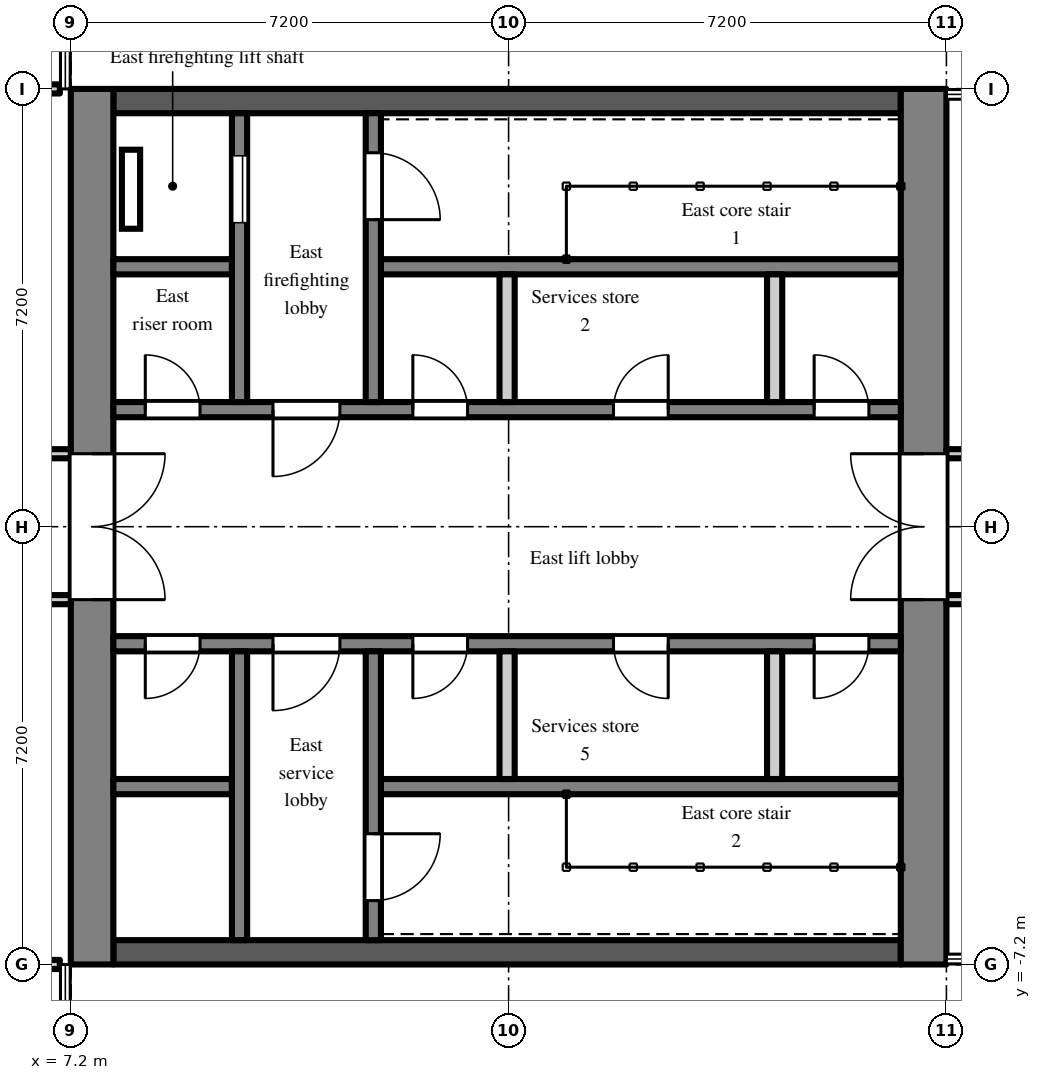
"""IFC4 building model, lengths in metres.
Left out: names, types, materials, properties, quantities, classifications, styles, units other than length and angle.
Written with IfcOpenShell. Run it as: python <this file> out.ifc"""

import sys

from ifc_helpers import new_model, si_unit, direction, frame, frame_2d, origin, place, context, subcontext, project, spatial, polyline, rectangle, outline, extrude, element, fill, save


model = new_model("IFC4")
c1 = context("Model", 3, precision=1e-05, world=origin(), true_north=direction((0.0, 1.0)))
c2 = subcontext(c1, "Body", "Model", "MODEL_VIEW")
j1 = project(units=[si_unit("LENGTHUNIT", "METRE"), si_unit("PLANEANGLEUNIT", "RADIAN")], contexts=[c1])
p1 = place(None, origin())
s1 = spatial("IfcSite", under=j1, at=p1, CompositionType="ELEMENT")
p2 = place(p1, origin())
s2 = spatial("IfcBuilding", under=s1, at=p2, CompositionType="ELEMENT")
p3 = place(p2, frame((0.0, 0.0, 247.5)))
s3 = spatial("IfcBuildingStorey", under=s2, at=p3, CompositionType="ELEMENT", Elevation=247.5)
p4 = place(p3, frame((7.55, -7.2, 0.0), z_axis=(0.0, 0.0, 1.0), x_axis=(0.0, 1.0, 0.0)))
e1 = element("IfcWall", 1, at=p4, inside=s3, PredefinedType="SHEAR", context=c2, shape_type="SweptSolid", body=[
    extrude(outline(polyline([(0.0, 0.0), (14.4, 0.0), (14.4, 10.033), (7.2, 13.7), (0.0, 10.033), (0.0, 0.0)])), frame((0.0, 0.35, 0.0), z_axis=(0.0, -1.0, 0.0), x_axis=(1.0, 0.0, 0.0)), (0.0, 0.0, 1.0), 0.7),
])
p5 = place(p4, frame((6.0, 0.0, 0.0)))
e2 = element("IfcOpeningElement", 2, at=p5, cuts=e1, PredefinedType="OPENING", context=c2, shape_type="SweptSolid", body=[
    extrude(rectangle(XDim=2.4, YDim=2.2, at=frame_2d((1.2, 1.1))), frame((0.0, 0.36, 0.0), z_axis=(0.0, -1.0, 0.0), x_axis=(1.0, 0.0, 0.0)), (0.0, 0.0, 1.0), 0.72),
])
p6 = place(p3, frame((21.225, -7.2, 0.0), z_axis=(0.0, 0.0, 1.0), x_axis=(0.0, 1.0, 0.0)))
e3 = element("IfcWall", 3, at=p6, inside=s3, PredefinedType="SHEAR", context=c2, shape_type="SweptSolid", body=[
    extrude(outline(polyline([(0.0, 0.0), (14.4, 0.0), (14.4, 10.033), (7.2, 13.7), (0.0, 10.033), (0.0, 0.0)])), frame((0.0, 0.375, 0.0), z_axis=(0.0, -1.0, 0.0), x_axis=(1.0, 0.0, 0.0)), (0.0, 0.0, 1.0), 0.75),
])
p7 = place(p6, frame((6.0, 0.0, 0.0)))
e4 = element("IfcOpeningElement", 4, at=p7, cuts=e3, PredefinedType="OPENING", context=c2, shape_type="SweptSolid", body=[
    extrude(rectangle(XDim=2.4, YDim=2.2, at=frame_2d((1.2, 1.1))), frame((0.0, 0.385, 0.0), z_axis=(0.0, -1.0, 0.0), x_axis=(1.0, 0.0, 0.0)), (0.0, 0.0, 1.0), 0.77),
])
p8 = place(p3, frame((7.9, 7.0, 0.0), z_axis=(0.0, 0.0, 1.0), x_axis=(1.0, 0.0, 0.0)))
e5 = element("IfcWall", 5, at=p8, inside=s3, PredefinedType="SHEAR", context=c2, shape_type="SweptSolid", body=[
    extrude(rectangle(XDim=12.95, YDim=0.4, at=frame_2d((6.475, 0.0))), origin(), (0.0, 0.0, 1.0), 10.135),
])
p9 = place(p3, frame((7.9, 1.925, 0.0), z_axis=(0.0, 0.0, 1.0), x_axis=(1.0, 0.0, 0.0)))
e6 = element("IfcWall", 6, at=p9, inside=s3, PredefinedType="SHEAR", context=c2, shape_type="SweptSolid", body=[
    extrude(rectangle(XDim=12.95, YDim=0.25, at=frame_2d((6.475, 0.0))), origin(), (0.0, 0.0, 1.0), 12.72),
])
p10 = place(p9, frame((0.525, 0.0, 0.0)))
e7 = element("IfcOpeningElement", 7, at=p10, cuts=e6, PredefinedType="OPENING", context=c2, shape_type="SweptSolid", body=[
    extrude(rectangle(XDim=0.9, YDim=2.1, at=frame_2d((0.45, 1.05))), frame((0.0, 0.135, 0.0), z_axis=(0.0, -1.0, 0.0), x_axis=(1.0, 0.0, 0.0)), (0.0, 0.0, 1.0), 0.27),
])
p11 = place(p9, frame((2.625, 0.0, 0.0)))
e8 = element("IfcOpeningElement", 8, at=p11, cuts=e6, PredefinedType="OPENING", context=c2, shape_type="SweptSolid", body=[
    extrude(rectangle(XDim=1.1, YDim=2.1, at=frame_2d((0.55, 1.05))), frame((0.0, 0.135, 0.0), z_axis=(0.0, -1.0, 0.0), x_axis=(1.0, 0.0, 0.0)), (0.0, 0.0, 1.0), 0.27),
])
p12 = place(p9, frame((4.925, 0.0, 0.0)))
e9 = element("IfcOpeningElement", 9, at=p12, cuts=e6, PredefinedType="OPENING", context=c2, shape_type="SweptSolid", body=[
    extrude(rectangle(XDim=0.9, YDim=2.1, at=frame_2d((0.45, 1.05))), frame((0.0, 0.135, 0.0), z_axis=(0.0, -1.0, 0.0), x_axis=(1.0, 0.0, 0.0)), (0.0, 0.0, 1.0), 0.27),
])
p13 = place(p9, frame((8.225, 0.0, 0.0)))
e10 = element("IfcOpeningElement", 10, at=p13, cuts=e6, PredefinedType="OPENING", context=c2, shape_type="SweptSolid", body=[
    extrude(rectangle(XDim=0.9, YDim=2.1, at=frame_2d((0.45, 1.05))), frame((0.0, 0.135, 0.0), z_axis=(0.0, -1.0, 0.0), x_axis=(1.0, 0.0, 0.0)), (0.0, 0.0, 1.0), 0.27),
])
p14 = place(p9, frame((11.525, 0.0, 0.0)))
e11 = element("IfcOpeningElement", 11, at=p14, cuts=e6, PredefinedType="OPENING", context=c2, shape_type="SweptSolid", body=[
    extrude(rectangle(XDim=0.9, YDim=2.1, at=frame_2d((0.45, 1.05))), frame((0.0, 0.135, 0.0), z_axis=(0.0, -1.0, 0.0), x_axis=(1.0, 0.0, 0.0)), (0.0, 0.0, 1.0), 0.27),
])
p15 = place(p3, frame((7.9, 4.275, 0.0), z_axis=(0.0, 0.0, 1.0), x_axis=(1.0, 0.0, 0.0)))
e12 = element("IfcWall", 12, at=p15, inside=s3, PredefinedType="SHEAR", context=c2, shape_type="SweptSolid", body=[
    extrude(rectangle(XDim=1.95, YDim=0.25, at=frame_2d((0.975, 0.0))), origin(), (0.0, 0.0, 1.0), 11.523),
])
p16 = place(p3, frame((12.3, 4.275, 0.0), z_axis=(0.0, 0.0, 1.0), x_axis=(1.0, 0.0, 0.0)))
e13 = element("IfcWall", 13, at=p16, inside=s3, PredefinedType="SHEAR", context=c2, shape_type="SweptSolid", body=[
    extrude(rectangle(XDim=8.55, YDim=0.25, at=frame_2d((4.275, 0.0))), origin(), (0.0, 0.0, 1.0), 11.523),
])
p17 = place(p3, frame((9.975, 2.05, 0.0), z_axis=(0.0, 0.0, 1.0), x_axis=(0.0, 1.0, 0.0)))
e14 = element("IfcWall", 14, at=p17, inside=s3, PredefinedType="SHEAR", context=c2, shape_type="SweptSolid", body=[
    extrude(outline(polyline([(0.0, 0.0), (4.75, 0.0), (4.75, 10.237), (0.0, 12.656), (0.0, 0.0)])), frame((0.0, 0.125, 0.0), z_axis=(0.0, -1.0, 0.0), x_axis=(1.0, 0.0, 0.0)), (0.0, 0.0, 1.0), 0.25),
])
p18 = place(p17, frame((2.95, 0.0, 0.0)))
e15 = element("IfcOpeningElement", 15, at=p18, cuts=e14, PredefinedType="OPENING", context=c2, shape_type="SweptSolid", body=[
    extrude(rectangle(XDim=1.1, YDim=2.1, at=frame_2d((0.55, 1.05))), frame((0.0, 0.135, 0.0), z_axis=(0.0, -1.0, 0.0), x_axis=(1.0, 0.0, 0.0)), (0.0, 0.0, 1.0), 0.27),
])
p19 = place(p3, frame((12.175, 2.05, 0.0), z_axis=(0.0, 0.0, 1.0), x_axis=(0.0, 1.0, 0.0)))
e16 = element("IfcWall", 16, at=p19, inside=s3, PredefinedType="SHEAR", context=c2, shape_type="SweptSolid", body=[
    extrude(outline(polyline([(0.0, 0.0), (4.75, 0.0), (4.75, 10.237), (0.0, 12.656), (0.0, 0.0)])), frame((0.0, 0.125, 0.0), z_axis=(0.0, -1.0, 0.0), x_axis=(1.0, 0.0, 0.0)), (0.0, 0.0, 1.0), 0.25),
])
p20 = place(p19, frame((3.0, 0.0, 0.0)))
e17 = element("IfcOpeningElement", 17, at=p20, cuts=e16, PredefinedType="OPENING", context=c2, shape_type="SweptSolid", body=[
    extrude(rectangle(XDim=1.1, YDim=2.1, at=frame_2d((0.55, 1.05))), frame((0.0, 0.135, 0.0), z_axis=(0.0, -1.0, 0.0), x_axis=(1.0, 0.0, 0.0)), (0.0, 0.0, 1.0), 0.27),
])
for number, where, z_axis, x_axis in (
    (18, (14.375, 2.05, 0.0), (0.0, 0.0, 1.0), (0.0, 1.0, 0.0)),
    (19, (18.775, 2.05, 0.0), (0.0, 0.0, 1.0), (0.0, 1.0, 0.0)),
):
    element("IfcWall", number, at=place(p3, frame(where, z_axis=z_axis, x_axis=x_axis)), inside=s3, PredefinedType="PARTITIONING", context=c2, shape_type="SweptSolid", body=[
        extrude(outline(polyline([(0.0, 0.0), (2.1, 0.0), (2.1, 11.587), (0.0, 12.656), (0.0, 0.0)])), frame((0.0, 0.125, 0.0), z_axis=(0.0, -1.0, 0.0), x_axis=(1.0, 0.0, 0.0)), (0.0, 0.0, 1.0), 0.25),
    ])
p21 = place(p3, frame((7.9, -7.0, 0.0), z_axis=(0.0, 0.0, 1.0), x_axis=(1.0, 0.0, 0.0)))
e20 = element("IfcWall", 20, at=p21, inside=s3, PredefinedType="SHEAR", context=c2, shape_type="SweptSolid", body=[
    extrude(rectangle(XDim=12.95, YDim=0.4, at=frame_2d((6.475, 0.0))), origin(), (0.0, 0.0, 1.0), 10.135),
])
p22 = place(p3, frame((7.9, -1.925, 0.0), z_axis=(0.0, 0.0, 1.0), x_axis=(1.0, 0.0, 0.0)))
e21 = element("IfcWall", 21, at=p22, inside=s3, PredefinedType="SHEAR", context=c2, shape_type="SweptSolid", body=[
    extrude(rectangle(XDim=12.95, YDim=0.25, at=frame_2d((6.475, 0.0))), origin(), (0.0, 0.0, 1.0), 12.72),
])
p23 = place(p22, frame((0.525, 0.0, 0.0)))
e22 = element("IfcOpeningElement", 22, at=p23, cuts=e21, PredefinedType="OPENING", context=c2, shape_type="SweptSolid", body=[
    extrude(rectangle(XDim=0.9, YDim=2.1, at=frame_2d((0.45, 1.05))), frame((0.0, 0.135, 0.0), z_axis=(0.0, -1.0, 0.0), x_axis=(1.0, 0.0, 0.0)), (0.0, 0.0, 1.0), 0.27),
])
p24 = place(p22, frame((2.625, 0.0, 0.0)))
e23 = element("IfcOpeningElement", 23, at=p24, cuts=e21, PredefinedType="OPENING", context=c2, shape_type="SweptSolid", body=[
    extrude(rectangle(XDim=1.1, YDim=2.1, at=frame_2d((0.55, 1.05))), frame((0.0, 0.135, 0.0), z_axis=(0.0, -1.0, 0.0), x_axis=(1.0, 0.0, 0.0)), (0.0, 0.0, 1.0), 0.27),
])
p25 = place(p22, frame((4.925, 0.0, 0.0)))
e24 = element("IfcOpeningElement", 24, at=p25, cuts=e21, PredefinedType="OPENING", context=c2, shape_type="SweptSolid", body=[
    extrude(rectangle(XDim=0.9, YDim=2.1, at=frame_2d((0.45, 1.05))), frame((0.0, 0.135, 0.0), z_axis=(0.0, -1.0, 0.0), x_axis=(1.0, 0.0, 0.0)), (0.0, 0.0, 1.0), 0.27),
])
p26 = place(p22, frame((8.225, 0.0, 0.0)))
e25 = element("IfcOpeningElement", 25, at=p26, cuts=e21, PredefinedType="OPENING", context=c2, shape_type="SweptSolid", body=[
    extrude(rectangle(XDim=0.9, YDim=2.1, at=frame_2d((0.45, 1.05))), frame((0.0, 0.135, 0.0), z_axis=(0.0, -1.0, 0.0), x_axis=(1.0, 0.0, 0.0)), (0.0, 0.0, 1.0), 0.27),
])
p27 = place(p22, frame((11.525, 0.0, 0.0)))
e26 = element("IfcOpeningElement", 26, at=p27, cuts=e21, PredefinedType="OPENING", context=c2, shape_type="SweptSolid", body=[
    extrude(rectangle(XDim=0.9, YDim=2.1, at=frame_2d((0.45, 1.05))), frame((0.0, 0.135, 0.0), z_axis=(0.0, -1.0, 0.0), x_axis=(1.0, 0.0, 0.0)), (0.0, 0.0, 1.0), 0.27),
])
p28 = place(p3, frame((7.9, -4.275, 0.0), z_axis=(0.0, 0.0, 1.0), x_axis=(1.0, 0.0, 0.0)))
e27 = element("IfcWall", 27, at=p28, inside=s3, PredefinedType="SHEAR", context=c2, shape_type="SweptSolid", body=[
    extrude(rectangle(XDim=1.95, YDim=0.25, at=frame_2d((0.975, 0.0))), origin(), (0.0, 0.0, 1.0), 11.523),
])
p29 = place(p3, frame((12.3, -4.275, 0.0), z_axis=(0.0, 0.0, 1.0), x_axis=(1.0, 0.0, 0.0)))
e28 = element("IfcWall", 28, at=p29, inside=s3, PredefinedType="SHEAR", context=c2, shape_type="SweptSolid", body=[
    extrude(rectangle(XDim=8.55, YDim=0.25, at=frame_2d((4.275, 0.0))), origin(), (0.0, 0.0, 1.0), 11.523),
])
p30 = place(p3, frame((9.975, -2.05, 0.0), z_axis=(0.0, 0.0, 1.0), x_axis=(0.0, -1.0, 0.0)))
e29 = element("IfcWall", 29, at=p30, inside=s3, PredefinedType="SHEAR", context=c2, shape_type="SweptSolid", body=[
    extrude(outline(polyline([(0.0, 0.0), (4.75, 0.0), (4.75, 10.237), (0.0, 12.656), (0.0, 0.0)])), frame((0.0, 0.125, 0.0), z_axis=(0.0, -1.0, 0.0), x_axis=(1.0, 0.0, 0.0)), (0.0, 0.0, 1.0), 0.25),
])
p31 = place(p3, frame((12.175, -2.05, 0.0), z_axis=(0.0, 0.0, 1.0), x_axis=(0.0, -1.0, 0.0)))
e30 = element("IfcWall", 30, at=p31, inside=s3, PredefinedType="SHEAR", context=c2, shape_type="SweptSolid", body=[
    extrude(outline(polyline([(0.0, 0.0), (4.75, 0.0), (4.75, 10.237), (0.0, 12.656), (0.0, 0.0)])), frame((0.0, 0.125, 0.0), z_axis=(0.0, -1.0, 0.0), x_axis=(1.0, 0.0, 0.0)), (0.0, 0.0, 1.0), 0.25),
])
p32 = place(p31, frame((3.0, 0.0, 0.0)))
e31 = element("IfcOpeningElement", 31, at=p32, cuts=e30, PredefinedType="OPENING", context=c2, shape_type="SweptSolid", body=[
    extrude(rectangle(XDim=1.1, YDim=2.1, at=frame_2d((0.55, 1.05))), frame((0.0, 0.135, 0.0), z_axis=(0.0, -1.0, 0.0), x_axis=(1.0, 0.0, 0.0)), (0.0, 0.0, 1.0), 0.27),
])
for number, where, z_axis, x_axis in (
    (32, (14.375, -2.05, 0.0), (0.0, 0.0, 1.0), (0.0, -1.0, 0.0)),
    (33, (18.775, -2.05, 0.0), (0.0, 0.0, 1.0), (0.0, -1.0, 0.0)),
):
    element("IfcWall", number, at=place(p3, frame(where, z_axis=z_axis, x_axis=x_axis)), inside=s3, PredefinedType="PARTITIONING", context=c2, shape_type="SweptSolid", body=[
        extrude(outline(polyline([(0.0, 0.0), (2.1, 0.0), (2.1, 11.587), (0.0, 12.656), (0.0, 0.0)])), frame((0.0, 0.125, 0.0), z_axis=(0.0, -1.0, 0.0), x_axis=(1.0, 0.0, 0.0)), (0.0, 0.0, 1.0), 0.25),
    ])
p33 = place(p3, frame((1.275, -7.2, 0.0), z_axis=(0.0, 0.0, 1.0), x_axis=(1.0, 0.0, 0.0)))
e34 = element("IfcWall", 34, at=p33, inside=s3, PredefinedType="PARTITIONING", context=c2, shape_type="SweptSolid", body=[
    extrude(rectangle(XDim=5.745, YDim=0.15, at=frame_2d((2.873, 0.0))), origin(), (0.0, 0.0, 1.0), 2.7),
])
p34 = place(p3, frame((1.275, -1.2, 0.0), z_axis=(0.0, 0.0, 1.0), x_axis=(1.0, 0.0, 0.0)))
e35 = element("IfcWall", 35, at=p34, inside=s3, PredefinedType="PARTITIONING", context=c2, shape_type="SweptSolid", body=[
    extrude(rectangle(XDim=5.925, YDim=0.15, at=frame_2d((2.962, 0.0))), origin(), (0.0, 0.0, 1.0), 2.7),
])
p35 = place(p3, frame((1.275, 1.2, 0.0), z_axis=(0.0, 0.0, 1.0), x_axis=(1.0, 0.0, 0.0)))
e36 = element("IfcWall", 36, at=p35, inside=s3, PredefinedType="PARTITIONING", context=c2, shape_type="SweptSolid", body=[
    extrude(rectangle(XDim=5.925, YDim=0.15, at=frame_2d((2.962, 0.0))), origin(), (0.0, 0.0, 1.0), 2.7),
])
p36 = place(p35, frame((0.1, 0.0, 0.0)))
e37 = element("IfcOpeningElement", 37, at=p36, cuts=e36, PredefinedType="OPENING", context=c2, shape_type="SweptSolid", body=[
    extrude(rectangle(XDim=1.2, YDim=2.1, at=frame_2d((0.6, 1.05))), frame((0.0, 0.085, 0.0), z_axis=(0.0, -1.0, 0.0), x_axis=(1.0, 0.0, 0.0)), (0.0, 0.0, 1.0), 0.17),
])
p37 = place(p3, frame((1.275, 7.2, 0.0), z_axis=(0.0, 0.0, 1.0), x_axis=(1.0, 0.0, 0.0)))
e38 = element("IfcWall", 38, at=p37, inside=s3, PredefinedType="PARTITIONING", context=c2, shape_type="SweptSolid", body=[
    extrude(rectangle(XDim=5.745, YDim=0.15, at=frame_2d((2.873, 0.0))), origin(), (0.0, 0.0, 1.0), 2.7),
])
p38 = place(p3, frame((21.6, -1.2, 0.0), z_axis=(0.0, 0.0, 1.0), x_axis=(1.0, 0.0, 0.0)))
e39 = element("IfcWall", 39, at=p38, inside=s3, PredefinedType="PARTITIONING", context=c2, shape_type="SweptSolid", body=[
    extrude(rectangle(XDim=3.525, YDim=0.15, at=frame_2d((1.762, 0.0))), origin(), (0.0, 0.0, 1.0), 2.7),
])
p39 = place(p38, frame((1.2, 0.0, 0.0)))
e40 = element("IfcOpeningElement", 40, at=p39, cuts=e39, PredefinedType="OPENING", context=c2, shape_type="SweptSolid", body=[
    extrude(rectangle(XDim=1.2, YDim=2.1, at=frame_2d((0.6, 1.05))), frame((0.0, 0.085, 0.0), z_axis=(0.0, -1.0, 0.0), x_axis=(1.0, 0.0, 0.0)), (0.0, 0.0, 1.0), 0.17),
])
p40 = place(p3, frame((21.6, 1.2, 0.0), z_axis=(0.0, 0.0, 1.0), x_axis=(1.0, 0.0, 0.0)))
e41 = element("IfcWall", 41, at=p40, inside=s3, PredefinedType="PARTITIONING", context=c2, shape_type="SweptSolid", body=[
    extrude(rectangle(XDim=3.525, YDim=0.15, at=frame_2d((1.762, 0.0))), origin(), (0.0, 0.0, 1.0), 2.7),
])
p41 = place(p40, frame((1.2, 0.0, 0.0)))
e42 = element("IfcOpeningElement", 42, at=p41, cuts=e41, PredefinedType="OPENING", context=c2, shape_type="SweptSolid", body=[
    extrude(rectangle(XDim=1.2, YDim=2.1, at=frame_2d((0.6, 1.05))), frame((0.0, 0.085, 0.0), z_axis=(0.0, -1.0, 0.0), x_axis=(1.0, 0.0, 0.0)), (0.0, 0.0, 1.0), 0.17),
])
p42 = place(p18, origin())
e43 = element("IfcDoor", 43, at=p42, inside=s3, OperationType="SLIDING_TO_LEFT", PredefinedType="DOOR", context=c2, shape_type="SweptSolid", body=[
    extrude(rectangle(XDim=1.1, YDim=2.1, at=frame_2d((0.55, 1.05))), frame((0.0, 0.025, 0.0), z_axis=(0.0, -1.0, 0.0), x_axis=(1.0, 0.0, 0.0)), (0.0, 0.0, 1.0), 0.05),
])
fill(e15, e43)
p43 = place(p20, frame((1.1, 0.0, 0.0), z_axis=(0.0, 0.0, 1.0), x_axis=(-1.0, 0.0, 0.0)))
e44 = element("IfcDoor", 44, at=p43, inside=s3, OperationType="SINGLE_SWING_RIGHT", PredefinedType="DOOR", context=c2, shape_type="SweptSolid", body=[
    extrude(rectangle(XDim=1.1, YDim=2.1, at=frame_2d((0.55, 1.05))), frame((0.0, 0.025, 0.0), z_axis=(0.0, -1.0, 0.0), x_axis=(1.0, 0.0, 0.0)), (0.0, 0.0, 1.0), 0.05),
])
fill(e17, e44)
p44 = place(p32, origin())
e45 = element("IfcDoor", 45, at=p44, inside=s3, OperationType="SINGLE_SWING_LEFT", PredefinedType="DOOR", context=c2, shape_type="SweptSolid", body=[
    extrude(rectangle(XDim=1.1, YDim=2.1, at=frame_2d((0.55, 1.05))), frame((0.0, 0.025, 0.0), z_axis=(0.0, -1.0, 0.0), x_axis=(1.0, 0.0, 0.0)), (0.0, 0.0, 1.0), 0.05),
])
fill(e31, e45)
p45 = place(p10, origin())
e46 = element("IfcDoor", 46, at=p45, inside=s3, OperationType="SINGLE_SWING_LEFT", PredefinedType="DOOR", context=c2, shape_type="SweptSolid", body=[
    extrude(rectangle(XDim=0.9, YDim=2.1, at=frame_2d((0.45, 1.05))), frame((0.0, 0.025, 0.0), z_axis=(0.0, -1.0, 0.0), x_axis=(1.0, 0.0, 0.0)), (0.0, 0.0, 1.0), 0.05),
])
fill(e7, e46)
p46 = place(p23, frame((0.9, 0.0, 0.0), z_axis=(0.0, 0.0, 1.0), x_axis=(-1.0, 0.0, 0.0)))
e47 = element("IfcDoor", 47, at=p46, inside=s3, OperationType="SINGLE_SWING_RIGHT", PredefinedType="DOOR", context=c2, shape_type="SweptSolid", body=[
    extrude(rectangle(XDim=0.9, YDim=2.1, at=frame_2d((0.45, 1.05))), frame((0.0, 0.025, 0.0), z_axis=(0.0, -1.0, 0.0), x_axis=(1.0, 0.0, 0.0)), (0.0, 0.0, 1.0), 0.05),
])
fill(e22, e47)
p47 = place(p11, frame((1.1, 0.0, 0.0), z_axis=(0.0, 0.0, 1.0), x_axis=(-1.0, 0.0, 0.0)))
e48 = element("IfcDoor", 48, at=p47, inside=s3, OperationType="SINGLE_SWING_RIGHT", PredefinedType="DOOR", context=c2, shape_type="SweptSolid", body=[
    extrude(rectangle(XDim=1.1, YDim=2.1, at=frame_2d((0.55, 1.05))), frame((0.0, 0.025, 0.0), z_axis=(0.0, -1.0, 0.0), x_axis=(1.0, 0.0, 0.0)), (0.0, 0.0, 1.0), 0.05),
])
fill(e8, e48)
p48 = place(p24, frame((1.1, 0.0, 0.0), z_axis=(0.0, 0.0, 1.0), x_axis=(-1.0, 0.0, 0.0)))
e49 = element("IfcDoor", 49, at=p48, inside=s3, OperationType="SINGLE_SWING_RIGHT", PredefinedType="DOOR", context=c2, shape_type="SweptSolid", body=[
    extrude(rectangle(XDim=1.1, YDim=2.1, at=frame_2d((0.55, 1.05))), frame((0.0, 0.025, 0.0), z_axis=(0.0, -1.0, 0.0), x_axis=(1.0, 0.0, 0.0)), (0.0, 0.0, 1.0), 0.05),
])
fill(e23, e49)
p49 = place(p5, frame((2.4, 0.0, 0.0), z_axis=(0.0, 0.0, 1.0), x_axis=(-1.0, 0.0, 0.0)))
e50 = element("IfcDoor", 50, at=p49, inside=s3, OperationType="DOUBLE_DOOR_DOUBLE_SWING", PredefinedType="DOOR", context=c2, shape_type="SweptSolid", body=[
    extrude(rectangle(XDim=2.4, YDim=2.2, at=frame_2d((1.2, 1.1))), frame((0.0, 0.025, 0.0), z_axis=(0.0, -1.0, 0.0), x_axis=(1.0, 0.0, 0.0)), (0.0, 0.0, 1.0), 0.05),
])
fill(e2, e50)
p50 = place(p7, origin())
e51 = element("IfcDoor", 51, at=p50, inside=s3, OperationType="DOUBLE_DOOR_DOUBLE_SWING", PredefinedType="DOOR", context=c2, shape_type="SweptSolid", body=[
    extrude(rectangle(XDim=2.4, YDim=2.2, at=frame_2d((1.2, 1.1))), frame((0.0, 0.025, 0.0), z_axis=(0.0, -1.0, 0.0), x_axis=(1.0, 0.0, 0.0)), (0.0, 0.0, 1.0), 0.05),
])
fill(e4, e51)
p51 = place(p12, origin())
e52 = element("IfcDoor", 52, at=p51, inside=s3, OperationType="SINGLE_SWING_LEFT", PredefinedType="DOOR", context=c2, shape_type="SweptSolid", body=[
    extrude(rectangle(XDim=0.9, YDim=2.1, at=frame_2d((0.45, 1.05))), frame((0.0, 0.025, 0.0), z_axis=(0.0, -1.0, 0.0), x_axis=(1.0, 0.0, 0.0)), (0.0, 0.0, 1.0), 0.05),
])
fill(e9, e52)
p52 = place(p13, origin())
e53 = element("IfcDoor", 53, at=p52, inside=s3, OperationType="SINGLE_SWING_RIGHT", PredefinedType="DOOR", context=c2, shape_type="SweptSolid", body=[
    extrude(rectangle(XDim=0.9, YDim=2.1, at=frame_2d((0.45, 1.05))), frame((0.0, 0.025, 0.0), z_axis=(0.0, -1.0, 0.0), x_axis=(1.0, 0.0, 0.0)), (0.0, 0.0, 1.0), 0.05),
])
fill(e10, e53)
p53 = place(p14, origin())
e54 = element("IfcDoor", 54, at=p53, inside=s3, OperationType="SINGLE_SWING_LEFT", PredefinedType="DOOR", context=c2, shape_type="SweptSolid", body=[
    extrude(rectangle(XDim=0.9, YDim=2.1, at=frame_2d((0.45, 1.05))), frame((0.0, 0.025, 0.0), z_axis=(0.0, -1.0, 0.0), x_axis=(1.0, 0.0, 0.0)), (0.0, 0.0, 1.0), 0.05),
])
fill(e11, e54)
p54 = place(p25, frame((0.9, 0.0, 0.0), z_axis=(0.0, 0.0, 1.0), x_axis=(-1.0, 0.0, 0.0)))
e55 = element("IfcDoor", 55, at=p54, inside=s3, OperationType="SINGLE_SWING_RIGHT", PredefinedType="DOOR", context=c2, shape_type="SweptSolid", body=[
    extrude(rectangle(XDim=0.9, YDim=2.1, at=frame_2d((0.45, 1.05))), frame((0.0, 0.025, 0.0), z_axis=(0.0, -1.0, 0.0), x_axis=(1.0, 0.0, 0.0)), (0.0, 0.0, 1.0), 0.05),
])
fill(e24, e55)
p55 = place(p26, frame((0.9, 0.0, 0.0), z_axis=(0.0, 0.0, 1.0), x_axis=(-1.0, 0.0, 0.0)))
e56 = element("IfcDoor", 56, at=p55, inside=s3, OperationType="SINGLE_SWING_LEFT", PredefinedType="DOOR", context=c2, shape_type="SweptSolid", body=[
    extrude(rectangle(XDim=0.9, YDim=2.1, at=frame_2d((0.45, 1.05))), frame((0.0, 0.025, 0.0), z_axis=(0.0, -1.0, 0.0), x_axis=(1.0, 0.0, 0.0)), (0.0, 0.0, 1.0), 0.05),
])
fill(e25, e56)
p56 = place(p27, frame((0.9, 0.0, 0.0), z_axis=(0.0, 0.0, 1.0), x_axis=(-1.0, 0.0, 0.0)))
e57 = element("IfcDoor", 57, at=p56, inside=s3, OperationType="SINGLE_SWING_RIGHT", PredefinedType="DOOR", context=c2, shape_type="SweptSolid", body=[
    extrude(rectangle(XDim=0.9, YDim=2.1, at=frame_2d((0.45, 1.05))), frame((0.0, 0.025, 0.0), z_axis=(0.0, -1.0, 0.0), x_axis=(1.0, 0.0, 0.0)), (0.0, 0.0, 1.0), 0.05),
])
fill(e26, e57)
save(model, sys.argv[1])
